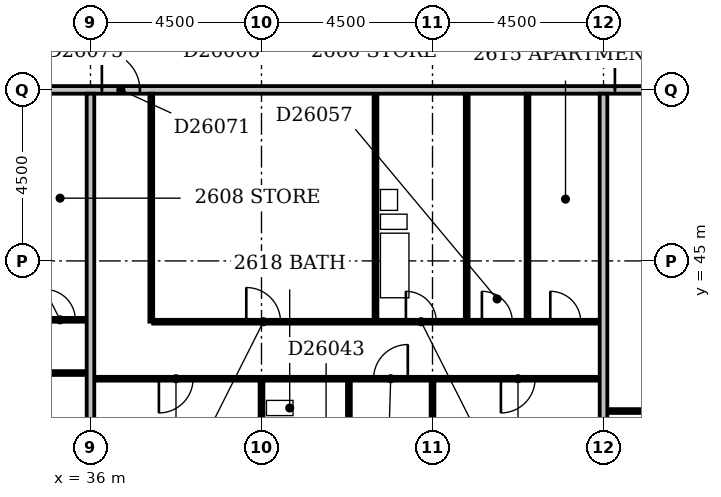
"""IFC4 building model, lengths in metres.
Left out: names, types, materials, properties, quantities, classifications, styles, units other than length and angle.
Written with IfcOpenShell. Run it as: python <this file> out.ifc"""

import sys

from ifc_helpers import new_model, si_unit, direction, frame, frame_2d, origin, place, context, subcontext, project, spatial, rectangle, extrude, element, fill, save


model = new_model("IFC4")
c1 = context("Model", 3, precision=1e-05, world=origin(), true_north=direction((0.0, 1.0)))
c2 = subcontext(c1, "Body", "Model", "MODEL_VIEW")
j1 = project(units=[si_unit("LENGTHUNIT", "METRE"), si_unit("PLANEANGLEUNIT", "RADIAN")], contexts=[c1])
p1 = place(None, origin())
s1 = spatial("IfcSite", under=j1, at=p1, CompositionType="ELEMENT")
p2 = place(p1, origin())
s2 = spatial("IfcBuilding", under=s1, at=p2, CompositionType="ELEMENT")
p3 = place(p2, frame((0.0, 0.0, 104.6)))
s3 = spatial("IfcBuildingStorey", under=s2, at=p3, CompositionType="ELEMENT", Elevation=104.6)
p4 = place(p3, frame((36.0, 36.6, 0.0), z_axis=(0.0, 0.0, 1.0), x_axis=(0.0, 1.0, 0.0)))
e1 = element("IfcWall", 1, at=p4, inside=s3, PredefinedType="PARTITIONING", context=c2, shape_type="SweptSolid", body=[
    extrude(rectangle(XDim=12.8, YDim=0.2, at=frame_2d((6.4, 0.0))), origin(), (0.0, 0.0, 1.0), 2.25),
])
p5 = place(p3, frame((40.5, 36.6, 0.0), z_axis=(0.0, 0.0, 1.0), x_axis=(0.0, 1.0, 0.0)))
e2 = element("IfcWall", 2, at=p5, inside=s3, PredefinedType="PARTITIONING", context=c2, shape_type="SweptSolid", body=[
    extrude(rectangle(XDim=5.25, YDim=0.1, at=frame_2d((2.625, 0.0))), origin(), (0.0, 0.0, 1.0), 3.15),
])
p6 = place(p3, frame((45.0, 36.6, 0.0), z_axis=(0.0, 0.0, 1.0), x_axis=(0.0, 1.0, 0.0)))
e3 = element("IfcWall", 3, at=p6, inside=s3, PredefinedType="PARTITIONING", context=c2, shape_type="SweptSolid", body=[
    extrude(rectangle(XDim=5.25, YDim=0.1, at=frame_2d((2.625, 0.0))), origin(), (0.0, 0.0, 1.0), 2.45),
])
p7 = place(p3, frame((49.5, 36.6, 0.0), z_axis=(0.0, 0.0, 1.0), x_axis=(0.0, 1.0, 0.0)))
e4 = element("IfcWall", 4, at=p7, inside=s3, PredefinedType="PARTITIONING", context=c2, shape_type="SweptSolid", body=[
    extrude(rectangle(XDim=12.8, YDim=0.2, at=frame_2d((6.4, 0.0))), origin(), (0.0, 0.0, 1.0), 3.15),
])
p8 = place(p3, frame((42.8, 39.0, 0.0), z_axis=(0.0, 0.0, 1.0), x_axis=(0.0, 1.0, 0.0)))
e5 = element("IfcWall", 5, at=p8, inside=s3, PredefinedType="PLUMBINGWALL", context=c2, shape_type="SweptSolid", body=[
    extrude(rectangle(XDim=2.85, YDim=0.1, at=frame_2d((1.425, 0.0))), origin(), (0.0, 0.0, 1.0), 3.15),
])
p9 = place(p8, frame((1.05, 0.0, 0.0)))
e6 = element("IfcOpeningElement", 6, at=p9, cuts=e5, PredefinedType="OPENING", context=c2, shape_type="SweptSolid", body=[
    extrude(rectangle(XDim=0.8, YDim=2.1, at=frame_2d((0.4, 1.05))), frame((0.0, 0.062, 0.0), z_axis=(0.0, -1.0, 0.0), x_axis=(1.0, 0.0, 0.0)), (0.0, 0.0, 1.0), 0.124),
])
p10 = place(p3, frame((49.6, 41.05, 0.0), z_axis=(0.0, 0.0, 1.0), x_axis=(1.0, 0.0, 0.0)))
e7 = element("IfcWall", 7, at=p10, inside=s3, PredefinedType="PARTITIONING", context=c2, shape_type="SweptSolid", body=[
    extrude(rectangle(XDim=17.3, YDim=0.1, at=frame_2d((8.65, 0.0))), origin(), (0.0, 0.0, 1.0), 3.15),
])
p11 = place(p10, frame((3.9, 0.0, 0.0)))
e8 = element("IfcOpeningElement", 8, at=p11, cuts=e7, PredefinedType="OPENING", context=c2, shape_type="SweptSolid", body=[
    extrude(rectangle(XDim=0.9, YDim=2.1, at=frame_2d((0.45, 1.05))), frame((0.0, 0.062, 0.0), z_axis=(0.0, -1.0, 0.0), x_axis=(1.0, 0.0, 0.0)), (0.0, 0.0, 1.0), 0.124),
])
p12 = place(p10, frame((10.7, 0.0, 0.0)))
e9 = element("IfcOpeningElement", 9, at=p12, cuts=e7, PredefinedType="OPENING", context=c2, shape_type="SweptSolid", body=[
    extrude(rectangle(XDim=0.9, YDim=2.1, at=frame_2d((0.45, 1.05))), frame((0.0, 0.062, 0.0), z_axis=(0.0, -1.0, 0.0), x_axis=(1.0, 0.0, 0.0)), (0.0, 0.0, 1.0), 0.124),
])
p13 = place(p10, frame((16.3, 0.0, 0.0)))
e10 = element("IfcOpeningElement", 10, at=p13, cuts=e7, PredefinedType="OPENING", context=c2, shape_type="SweptSolid", body=[
    extrude(rectangle(XDim=0.9, YDim=2.1, at=frame_2d((0.45, 1.05))), frame((0.0, 0.062, 0.0), z_axis=(0.0, -1.0, 0.0), x_axis=(1.0, 0.0, 0.0)), (0.0, 0.0, 1.0), 0.124),
])
p14 = place(p3, frame((36.1, 41.9, 0.0), z_axis=(0.0, 0.0, 1.0), x_axis=(1.0, 0.0, 0.0)))
e11 = element("IfcWall", 11, at=p14, inside=s3, PredefinedType="PARTITIONING", context=c2, shape_type="SweptSolid", body=[
    extrude(rectangle(XDim=13.3, YDim=0.1, at=frame_2d((6.65, 0.0))), origin(), (0.0, 0.0, 1.0), 3.15),
])
p15 = place(p14, frame((1.7, 0.0, 0.0)))
e12 = element("IfcOpeningElement", 12, at=p15, cuts=e11, PredefinedType="OPENING", context=c2, shape_type="SweptSolid", body=[
    extrude(rectangle(XDim=0.9, YDim=2.1, at=frame_2d((0.45, 1.05))), frame((0.0, 0.062, 0.0), z_axis=(0.0, -1.0, 0.0), x_axis=(1.0, 0.0, 0.0)), (0.0, 0.0, 1.0), 0.124),
])
p16 = place(p14, frame((7.35, 0.0, 0.0)))
e13 = element("IfcOpeningElement", 13, at=p16, cuts=e11, PredefinedType="OPENING", context=c2, shape_type="SweptSolid", body=[
    extrude(rectangle(XDim=0.9, YDim=2.1, at=frame_2d((0.45, 1.05))), frame((0.0, 0.062, 0.0), z_axis=(0.0, -1.0, 0.0), x_axis=(1.0, 0.0, 0.0)), (0.0, 0.0, 1.0), 0.124),
])
p17 = place(p14, frame((10.7, 0.0, 0.0)))
e14 = element("IfcOpeningElement", 14, at=p17, cuts=e11, PredefinedType="OPENING", context=c2, shape_type="SweptSolid", body=[
    extrude(rectangle(XDim=0.9, YDim=2.1, at=frame_2d((0.45, 1.05))), frame((0.0, 0.062, 0.0), z_axis=(0.0, -1.0, 0.0), x_axis=(1.0, 0.0, 0.0)), (0.0, 0.0, 1.0), 0.124),
])
p18 = place(p3, frame((27.1, 42.05, 0.0), z_axis=(0.0, 0.0, 1.0), x_axis=(1.0, 0.0, 0.0)))
e15 = element("IfcWall", 15, at=p18, inside=s3, PredefinedType="PARTITIONING", context=c2, shape_type="SweptSolid", body=[
    extrude(rectangle(XDim=8.8, YDim=0.1, at=frame_2d((4.4, 0.0))), origin(), (0.0, 0.0, 1.0), 3.15),
])
p19 = place(p18, frame((1.7, 0.0, 0.0)))
e16 = element("IfcOpeningElement", 16, at=p19, cuts=e15, PredefinedType="OPENING", context=c2, shape_type="SweptSolid", body=[
    extrude(rectangle(XDim=0.9, YDim=2.1, at=frame_2d((0.45, 1.05))), frame((0.0, 0.062, 0.0), z_axis=(0.0, -1.0, 0.0), x_axis=(1.0, 0.0, 0.0)), (0.0, 0.0, 1.0), 0.124),
])
p20 = place(p18, frame((6.2, 0.0, 0.0)))
e17 = element("IfcOpeningElement", 17, at=p20, cuts=e15, PredefinedType="OPENING", context=c2, shape_type="SweptSolid", body=[
    extrude(rectangle(XDim=0.9, YDim=2.1, at=frame_2d((0.45, 1.05))), frame((0.0, 0.062, 0.0), z_axis=(0.0, -1.0, 0.0), x_axis=(1.0, 0.0, 0.0)), (0.0, 0.0, 1.0), 0.124),
])
p21 = place(p3, frame((37.6, 43.4, 0.0), z_axis=(0.0, 0.0, 1.0), x_axis=(0.0, 1.0, 0.0)))
e18 = element("IfcWall", 18, at=p21, inside=s3, PredefinedType="PARTITIONING", context=c2, shape_type="SweptSolid", body=[
    extrude(rectangle(XDim=6.0, YDim=0.1, at=frame_2d((3.0, 0.0))), origin(), (0.0, 0.0, 1.0), 3.15),
])
p22 = place(p3, frame((37.65, 43.4, 0.0), z_axis=(0.0, 0.0, 1.0), x_axis=(1.0, 0.0, 0.0)))
e19 = element("IfcWall", 19, at=p22, inside=s3, PredefinedType="PARTITIONING", context=c2, shape_type="SweptSolid", body=[
    extrude(rectangle(XDim=11.75, YDim=0.1, at=frame_2d((5.875, 0.0))), origin(), (0.0, 0.0, 1.0), 3.15),
])
p23 = place(p22, frame((6.65, 0.0, 0.0)))
e20 = element("IfcOpeningElement", 20, at=p23, cuts=e19, PredefinedType="OPENING", context=c2, shape_type="SweptSolid", body=[
    extrude(rectangle(XDim=0.8, YDim=2.1, at=frame_2d((0.4, 1.05))), frame((0.0, 0.062, 0.0), z_axis=(0.0, -1.0, 0.0), x_axis=(1.0, 0.0, 0.0)), (0.0, 0.0, 1.0), 0.124),
])
p24 = place(p22, frame((2.45, 0.0, 0.0)))
e21 = element("IfcOpeningElement", 21, at=p24, cuts=e19, PredefinedType="OPENING", context=c2, shape_type="SweptSolid", body=[
    extrude(rectangle(XDim=0.9, YDim=2.1, at=frame_2d((0.45, 1.05))), frame((0.0, 0.062, 0.0), z_axis=(0.0, -1.0, 0.0), x_axis=(1.0, 0.0, 0.0)), (0.0, 0.0, 1.0), 0.124),
])
p25 = place(p22, frame((8.65, 0.0, 0.0)))
e22 = element("IfcOpeningElement", 22, at=p25, cuts=e19, PredefinedType="OPENING", context=c2, shape_type="SweptSolid", body=[
    extrude(rectangle(XDim=0.8, YDim=2.1, at=frame_2d((0.4, 1.05))), frame((0.0, 0.062, 0.0), z_axis=(0.0, -1.0, 0.0), x_axis=(1.0, 0.0, 0.0)), (0.0, 0.0, 1.0), 0.124),
])
p26 = place(p22, frame((10.45, 0.0, 0.0)))
e23 = element("IfcOpeningElement", 23, at=p26, cuts=e19, PredefinedType="OPENING", context=c2, shape_type="SweptSolid", body=[
    extrude(rectangle(XDim=0.8, YDim=2.1, at=frame_2d((0.4, 1.05))), frame((0.0, 0.062, 0.0), z_axis=(0.0, -1.0, 0.0), x_axis=(1.0, 0.0, 0.0)), (0.0, 0.0, 1.0), 0.124),
])
p27 = place(p3, frame((31.05, 43.45, 0.0), z_axis=(0.0, 0.0, 1.0), x_axis=(1.0, 0.0, 0.0)))
e24 = element("IfcWall", 24, at=p27, inside=s3, PredefinedType="PARTITIONING", context=c2, shape_type="SweptSolid", body=[
    extrude(rectangle(XDim=4.85, YDim=0.1, at=frame_2d((2.425, 0.0))), origin(), (0.0, 0.0, 1.0), 3.15),
])
p28 = place(p27, frame((1.2, 0.0, 0.0)))
e25 = element("IfcOpeningElement", 25, at=p28, cuts=e24, PredefinedType="OPENING", context=c2, shape_type="SweptSolid", body=[
    extrude(rectangle(XDim=0.9, YDim=2.1, at=frame_2d((0.45, 1.05))), frame((0.0, 0.062, 0.0), z_axis=(0.0, -1.0, 0.0), x_axis=(1.0, 0.0, 0.0)), (0.0, 0.0, 1.0), 0.124),
])
p29 = place(p27, frame((3.75, 0.0, 0.0)))
e26 = element("IfcOpeningElement", 26, at=p29, cuts=e24, PredefinedType="OPENING", context=c2, shape_type="SweptSolid", body=[
    extrude(rectangle(XDim=0.8, YDim=2.1, at=frame_2d((0.4, 1.05))), frame((0.0, 0.062, 0.0), z_axis=(0.0, -1.0, 0.0), x_axis=(1.0, 0.0, 0.0)), (0.0, 0.0, 1.0), 0.124),
])
for number, where, z_axis, x_axis in (
    (27, (43.5, 43.45, 0.0), (0.0, 0.0, 1.0), (0.0, 1.0, 0.0)),
    (28, (45.9, 43.45, 0.0), (0.0, 0.0, 1.0), (0.0, 1.0, 0.0)),
):
    element("IfcWall", number, at=place(p3, frame(where, z_axis=z_axis, x_axis=x_axis)), inside=s3, PredefinedType="PLUMBINGWALL", context=c2, shape_type="SweptSolid", body=[
        extrude(rectangle(XDim=5.95, YDim=0.1, at=frame_2d((2.975, 0.0))), origin(), (0.0, 0.0, 1.0), 3.15),
    ])
p30 = place(p3, frame((47.5, 43.45, 0.0), z_axis=(0.0, 0.0, 1.0), x_axis=(0.0, 1.0, 0.0)))
e29 = element("IfcWall", 29, at=p30, inside=s3, PredefinedType="PARTITIONING", context=c2, shape_type="SweptSolid", body=[
    extrude(rectangle(XDim=5.95, YDim=0.1, at=frame_2d((2.975, 0.0))), origin(), (0.0, 0.0, 1.0), 3.15),
])
p31 = place(p3, frame((9.1, 49.5, 0.0), z_axis=(0.0, 0.0, 1.0), x_axis=(1.0, 0.0, 0.0)))
e30 = element("IfcWall", 30, at=p31, inside=s3, PredefinedType="PARTITIONING", context=c2, shape_type="SweptSolid", body=[
    extrude(rectangle(XDim=57.8, YDim=0.2, at=frame_2d((28.9, 0.0))), origin(), (0.0, 0.0, 1.0), 3.15),
])
p32 = place(p31, frame((14.95, 0.0, 0.0)))
e31 = element("IfcOpeningElement", 31, at=p32, cuts=e30, PredefinedType="OPENING", context=c2, shape_type="SweptSolid", body=[
    extrude(rectangle(XDim=1.0, YDim=2.1, at=frame_2d((0.5, 1.05))), frame((0.0, 0.112, 0.0), z_axis=(0.0, -1.0, 0.0), x_axis=(1.0, 0.0, 0.0)), (0.0, 0.0, 1.0), 0.224),
])
p33 = place(p31, frame((20.6, 0.0, 0.0)))
e32 = element("IfcOpeningElement", 32, at=p33, cuts=e30, PredefinedType="OPENING", context=c2, shape_type="SweptSolid", body=[
    extrude(rectangle(XDim=1.0, YDim=2.1, at=frame_2d((0.5, 1.05))), frame((0.0, 0.112, 0.0), z_axis=(0.0, -1.0, 0.0), x_axis=(1.0, 0.0, 0.0)), (0.0, 0.0, 1.0), 0.224),
])
p34 = place(p31, frame((27.2, 0.0, 0.0)))
e33 = element("IfcOpeningElement", 33, at=p34, cuts=e30, PredefinedType="OPENING", context=c2, shape_type="SweptSolid", body=[
    extrude(rectangle(XDim=1.0, YDim=2.1, at=frame_2d((0.5, 1.05))), frame((0.0, 0.112, 0.0), z_axis=(0.0, -1.0, 0.0), x_axis=(1.0, 0.0, 0.0)), (0.0, 0.0, 1.0), 0.224),
])
p35 = place(p31, frame((40.7, 0.0, 0.0)))
e34 = element("IfcOpeningElement", 34, at=p35, cuts=e30, PredefinedType="OPENING", context=c2, shape_type="SweptSolid", body=[
    extrude(rectangle(XDim=1.0, YDim=2.1, at=frame_2d((0.5, 1.05))), frame((0.0, 0.112, 0.0), z_axis=(0.0, -1.0, 0.0), x_axis=(1.0, 0.0, 0.0)), (0.0, 0.0, 1.0), 0.224),
])
p36 = place(p31, frame((10.65, 0.0, 0.0)))
e35 = element("IfcOpeningElement", 35, at=p36, cuts=e30, PredefinedType="OPENING", context=c2, shape_type="SweptSolid", body=[
    extrude(rectangle(XDim=0.9, YDim=2.1, at=frame_2d((0.45, 1.05))), frame((0.0, 0.112, 0.0), z_axis=(0.0, -1.0, 0.0), x_axis=(1.0, 0.0, 0.0)), (0.0, 0.0, 1.0), 0.224),
])
p37 = place(p15, frame((0.9, 0.0, 0.0), z_axis=(0.0, 0.0, 1.0), x_axis=(-1.0, 0.0, 0.0)))
e36 = element("IfcDoor", 36, at=p37, inside=s3, OperationType="SINGLE_SWING_RIGHT", PredefinedType="DOOR", context=c2, shape_type="SweptSolid", body=[
    extrude(rectangle(XDim=0.9, YDim=2.1, at=frame_2d((0.45, 1.05))), frame((0.0, 0.025, 0.0), z_axis=(0.0, -1.0, 0.0), x_axis=(1.0, 0.0, 0.0)), (0.0, 0.0, 1.0), 0.05),
])
fill(e12, e36)
p38 = place(p16, frame((0.9, 0.0, 0.0), z_axis=(0.0, 0.0, 1.0), x_axis=(-1.0, 0.0, 0.0)))
e37 = element("IfcDoor", 37, at=p38, inside=s3, OperationType="SINGLE_SWING_LEFT", PredefinedType="DOOR", context=c2, shape_type="SweptSolid", body=[
    extrude(rectangle(XDim=0.9, YDim=2.1, at=frame_2d((0.45, 1.05))), frame((0.0, 0.025, 0.0), z_axis=(0.0, -1.0, 0.0), x_axis=(1.0, 0.0, 0.0)), (0.0, 0.0, 1.0), 0.05),
])
fill(e13, e37)
p39 = place(p17, frame((0.9, 0.0, 0.0), z_axis=(0.0, 0.0, 1.0), x_axis=(-1.0, 0.0, 0.0)))
e38 = element("IfcDoor", 38, at=p39, inside=s3, OperationType="SINGLE_SWING_RIGHT", PredefinedType="DOOR", context=c2, shape_type="SweptSolid", body=[
    extrude(rectangle(XDim=0.9, YDim=2.1, at=frame_2d((0.45, 1.05))), frame((0.0, 0.025, 0.0), z_axis=(0.0, -1.0, 0.0), x_axis=(1.0, 0.0, 0.0)), (0.0, 0.0, 1.0), 0.05),
])
fill(e14, e38)
p40 = place(p23, origin())
e39 = element("IfcDoor", 39, at=p40, inside=s3, OperationType="SINGLE_SWING_LEFT", PredefinedType="DOOR", context=c2, shape_type="SweptSolid", body=[
    extrude(rectangle(XDim=0.8, YDim=2.1, at=frame_2d((0.4, 1.05))), frame((0.0, 0.025, 0.0), z_axis=(0.0, -1.0, 0.0), x_axis=(1.0, 0.0, 0.0)), (0.0, 0.0, 1.0), 0.05),
])
fill(e20, e39)
p41 = place(p24, origin())
e40 = element("IfcDoor", 40, at=p41, inside=s3, OperationType="SINGLE_SWING_LEFT", PredefinedType="DOOR", context=c2, shape_type="SweptSolid", body=[
    extrude(rectangle(XDim=0.9, YDim=2.1, at=frame_2d((0.45, 1.05))), frame((0.0, 0.025, 0.0), z_axis=(0.0, -1.0, 0.0), x_axis=(1.0, 0.0, 0.0)), (0.0, 0.0, 1.0), 0.05),
])
fill(e21, e40)
p42 = place(p25, origin())
e41 = element("IfcDoor", 41, at=p42, inside=s3, OperationType="SINGLE_SWING_LEFT", PredefinedType="DOOR", context=c2, shape_type="SweptSolid", body=[
    extrude(rectangle(XDim=0.8, YDim=2.1, at=frame_2d((0.4, 1.05))), frame((0.0, 0.025, 0.0), z_axis=(0.0, -1.0, 0.0), x_axis=(1.0, 0.0, 0.0)), (0.0, 0.0, 1.0), 0.05),
])
fill(e22, e41)
p43 = place(p26, origin())
e42 = element("IfcDoor", 42, at=p43, inside=s3, OperationType="SINGLE_SWING_LEFT", PredefinedType="DOOR", context=c2, shape_type="SweptSolid", body=[
    extrude(rectangle(XDim=0.8, YDim=2.1, at=frame_2d((0.4, 1.05))), frame((0.0, 0.025, 0.0), z_axis=(0.0, -1.0, 0.0), x_axis=(1.0, 0.0, 0.0)), (0.0, 0.0, 1.0), 0.05),
])
fill(e23, e42)
p44 = place(p29, origin())
e43 = element("IfcDoor", 43, at=p44, inside=s3, OperationType="SINGLE_SWING_LEFT", PredefinedType="DOOR", context=c2, shape_type="SweptSolid", body=[
    extrude(rectangle(XDim=0.8, YDim=2.1, at=frame_2d((0.4, 1.05))), frame((0.0, 0.025, 0.0), z_axis=(0.0, -1.0, 0.0), x_axis=(1.0, 0.0, 0.0)), (0.0, 0.0, 1.0), 0.05),
])
fill(e26, e43)
p45 = place(p34, origin())
e44 = element("IfcDoor", 44, at=p45, inside=s3, OperationType="SINGLE_SWING_LEFT", PredefinedType="DOOR", context=c2, shape_type="SweptSolid", body=[
    extrude(rectangle(XDim=1.0, YDim=2.1, at=frame_2d((0.5, 1.05))), frame((0.0, 0.025, 0.0), z_axis=(0.0, -1.0, 0.0), x_axis=(1.0, 0.0, 0.0)), (0.0, 0.0, 1.0), 0.05),
])
fill(e33, e44)
p46 = place(p35, origin())
e45 = element("IfcDoor", 45, at=p46, inside=s3, OperationType="SINGLE_SWING_LEFT", PredefinedType="DOOR", context=c2, shape_type="SweptSolid", body=[
    extrude(rectangle(XDim=1.0, YDim=2.1, at=frame_2d((0.5, 1.05))), frame((0.0, 0.025, 0.0), z_axis=(0.0, -1.0, 0.0), x_axis=(1.0, 0.0, 0.0)), (0.0, 0.0, 1.0), 0.05),
])
fill(e34, e45)
save(model, sys.argv[1])
